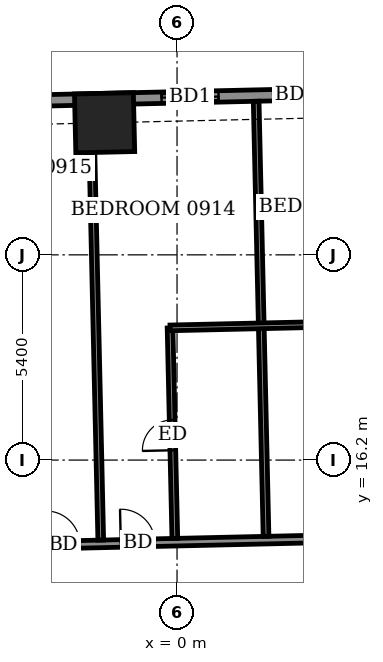
"""IFC4 building model, lengths in metres.
Left out: names, types, materials, properties, quantities, classifications, styles, units other than length and angle.
Written with IfcOpenShell. Run it as: python <this file> out.ifc"""

import sys

from ifc_helpers import new_model, si_unit, direction, frame, frame_2d, origin, origin_2d, place, context, subcontext, project, spatial, rectangle, extrude, element, fill, save


model = new_model("IFC4")
c1 = context("Model", 3, precision=1e-05, world=origin(), true_north=direction((0.0, 1.0)))
c2 = subcontext(c1, "Body", "Model", "MODEL_VIEW")
j1 = project(units=[si_unit("LENGTHUNIT", "METRE"), si_unit("PLANEANGLEUNIT", "RADIAN")], contexts=[c1])
p1 = place(None, origin())
s1 = spatial("IfcSite", under=j1, at=p1, CompositionType="ELEMENT")
p2 = place(p1, origin())
s2 = spatial("IfcBuilding", under=s1, at=p2, CompositionType="ELEMENT")
p3 = place(p2, frame((0.0, 0.0, 41.3)))
s3 = spatial("IfcBuildingStorey", under=s2, at=p3, CompositionType="ELEMENT", Elevation=41.3)
p4 = place(p3, frame((-1.906, 25.075, -0.55), z_axis=(0.0, 0.0, 1.0), x_axis=(-0.999741913532, -0.022717973655, 0.0)))
e1 = element("IfcColumn", 1, at=p4, inside=s3, PredefinedType="COLUMN", context=c2, shape_type="SweptSolid", body=[
    extrude(rectangle(XDim=1.55, YDim=1.55, at=origin_2d()), origin(), (0.0, 0.0, 1.0), 3.6),
])
p5 = place(p3, frame((24.423, 26.298, 0.0), z_axis=(0.0, 0.0, 1.0), x_axis=(-0.999742433108, -0.022695097355, 0.0)))
e2 = element("IfcWall", 2, at=p5, inside=s3, PredefinedType="SOLIDWALL", context=c2, shape_type="SweptSolid", body=[
    extrude(rectangle(XDim=52.701, YDim=0.3, at=frame_2d((26.35, 0.0))), origin(), (0.0, 0.0, 1.0), 3.05),
])
p6 = place(p5, frame((2.357, 0.0, 0.0)))
e3 = element("IfcOpeningElement", 3, at=p6, cuts=e2, PredefinedType="OPENING", context=c2, shape_type="SweptSolid", body=[
    extrude(rectangle(XDim=1.5, YDim=2.4, at=frame_2d((0.75, 1.2))), frame((0.0, 0.16, 0.0), z_axis=(0.0, -1.0, 0.0), x_axis=(1.0, 0.0, 0.0)), (0.0, 0.0, 1.0), 0.32),
])
p7 = place(p5, frame((7.475, 0.0, 0.0)))
e4 = element("IfcOpeningElement", 4, at=p7, cuts=e2, PredefinedType="OPENING", context=c2, shape_type="SweptSolid", body=[
    extrude(rectangle(XDim=1.5, YDim=2.4, at=frame_2d((0.75, 1.2))), frame((0.0, 0.16, 0.0), z_axis=(0.0, -1.0, 0.0), x_axis=(1.0, 0.0, 0.0)), (0.0, 0.0, 1.0), 0.32),
])
p8 = place(p5, frame((10.262, 0.0, 0.0)))
e5 = element("IfcOpeningElement", 5, at=p8, cuts=e2, PredefinedType="OPENING", context=c2, shape_type="SweptSolid", body=[
    extrude(rectangle(XDim=1.5, YDim=2.4, at=frame_2d((0.75, 1.2))), frame((0.0, 0.16, 0.0), z_axis=(0.0, -1.0, 0.0), x_axis=(1.0, 0.0, 0.0)), (0.0, 0.0, 1.0), 0.32),
])
p9 = place(p5, frame((15.1, 0.0, 0.0)))
e6 = element("IfcOpeningElement", 6, at=p9, cuts=e2, PredefinedType="OPENING", context=c2, shape_type="SweptSolid", body=[
    extrude(rectangle(XDim=1.5, YDim=2.4, at=frame_2d((0.75, 1.2))), frame((0.0, 0.16, 0.0), z_axis=(0.0, -1.0, 0.0), x_axis=(1.0, 0.0, 0.0)), (0.0, 0.0, 1.0), 0.32),
])
p10 = place(p5, frame((20.7, 0.0, 0.0)))
e7 = element("IfcOpeningElement", 7, at=p10, cuts=e2, PredefinedType="OPENING", context=c2, shape_type="SweptSolid", body=[
    extrude(rectangle(XDim=1.2, YDim=2.4, at=frame_2d((0.6, 1.2))), frame((0.0, 0.16, 0.0), z_axis=(0.0, -1.0, 0.0), x_axis=(1.0, 0.0, 0.0)), (0.0, 0.0, 1.0), 0.32),
])
p11 = place(p5, frame((23.337, 0.0, 0.0)))
e8 = element("IfcOpeningElement", 8, at=p11, cuts=e2, PredefinedType="OPENING", context=c2, shape_type="SweptSolid", body=[
    extrude(rectangle(XDim=1.5, YDim=2.4, at=frame_2d((0.75, 1.2))), frame((0.0, 0.16, 0.0), z_axis=(0.0, -1.0, 0.0), x_axis=(1.0, 0.0, 0.0)), (0.0, 0.0, 1.0), 0.32),
])
p12 = place(p5, frame((28.238, 0.0, 0.0)))
e9 = element("IfcOpeningElement", 9, at=p12, cuts=e2, PredefinedType="OPENING", context=c2, shape_type="SweptSolid", body=[
    extrude(rectangle(XDim=1.5, YDim=2.4, at=frame_2d((0.75, 1.2))), frame((0.0, 0.16, 0.0), z_axis=(0.0, -1.0, 0.0), x_axis=(1.0, 0.0, 0.0)), (0.0, 0.0, 1.0), 0.32),
])
p13 = place(p5, frame((33.9, 0.0, 0.0)))
e10 = element("IfcOpeningElement", 10, at=p13, cuts=e2, PredefinedType="OPENING", context=c2, shape_type="SweptSolid", body=[
    extrude(rectangle(XDim=1.2, YDim=2.4, at=frame_2d((0.6, 1.2))), frame((0.0, 0.16, 0.0), z_axis=(0.0, -1.0, 0.0), x_axis=(1.0, 0.0, 0.0)), (0.0, 0.0, 1.0), 0.32),
])
p14 = place(p5, frame((36.538, 0.0, 0.0)))
e11 = element("IfcOpeningElement", 11, at=p14, cuts=e2, PredefinedType="OPENING", context=c2, shape_type="SweptSolid", body=[
    extrude(rectangle(XDim=1.5, YDim=2.4, at=frame_2d((0.75, 1.2))), frame((0.0, 0.16, 0.0), z_axis=(0.0, -1.0, 0.0), x_axis=(1.0, 0.0, 0.0)), (0.0, 0.0, 1.0), 0.32),
])
p15 = place(p5, frame((41.338, 0.0, 0.0)))
e12 = element("IfcOpeningElement", 12, at=p15, cuts=e2, PredefinedType="OPENING", context=c2, shape_type="SweptSolid", body=[
    extrude(rectangle(XDim=1.5, YDim=2.4, at=frame_2d((0.75, 1.2))), frame((0.0, 0.16, 0.0), z_axis=(0.0, -1.0, 0.0), x_axis=(1.0, 0.0, 0.0)), (0.0, 0.0, 1.0), 0.32),
])
p16 = place(p5, frame((44.4, 0.0, 0.9)))
e13 = element("IfcOpeningElement", 13, at=p16, cuts=e2, PredefinedType="OPENING", context=c2, shape_type="SweptSolid", body=[
    extrude(rectangle(XDim=0.9, YDim=1.5, at=frame_2d((0.45, 0.75))), frame((0.0, 0.16, 0.0), z_axis=(0.0, -1.0, 0.0), x_axis=(1.0, 0.0, 0.0)), (0.0, 0.0, 1.0), 0.32),
])
p17 = place(p5, frame((48.764, 0.0, 0.9)))
e14 = element("IfcOpeningElement", 14, at=p17, cuts=e2, PredefinedType="OPENING", context=c2, shape_type="SweptSolid", body=[
    extrude(rectangle(XDim=2.4, YDim=1.5, at=frame_2d((1.2, 0.75))), frame((0.0, 0.16, 0.0), z_axis=(0.0, -1.0, 0.0), x_axis=(1.0, 0.0, 0.0)), (0.0, 0.0, 1.0), 0.32),
])
p18 = place(p3, frame((-1.953, 27.149, 0.0), z_axis=(0.0, 0.0, 1.0), x_axis=(0.999743226877, 0.02266010399, 0.0)))
e15 = element("IfcWall", 15, at=p18, inside=s3, PredefinedType="USERDEFINED", context=c2, shape_type="SweptSolid", body=[
    extrude(rectangle(XDim=5.699, YDim=0.55, at=frame_2d((2.85, 0.0))), origin(), (0.0, 0.0, 1.0), 0.8),
])
p19 = place(p3, frame((-31.347, 13.329, 0.0), z_axis=(0.0, 0.0, 1.0), x_axis=(0.999742613079, 0.022687168058, 0.0)))
e16 = element("IfcWall", 16, at=p19, inside=s3, PredefinedType="PARTITIONING", context=c2, shape_type="SweptSolid", body=[
    extrude(rectangle(XDim=58.799, YDim=0.2, at=frame_2d((29.399, 0.0))), origin(), (0.0, 0.0, 1.0), 3.05),
])
p20 = place(p19, frame((56.45, 0.0, 0.0)))
e17 = element("IfcOpeningElement", 17, at=p20, cuts=e16, PredefinedType="OPENING", context=c2, shape_type="SweptSolid", body=[
    extrude(rectangle(XDim=1.0, YDim=2.1, at=frame_2d((0.5, 1.05))), frame((0.0, 0.11, 0.0), z_axis=(0.0, -1.0, 0.0), x_axis=(1.0, 0.0, 0.0)), (0.0, 0.0, 1.0), 0.22),
])
p21 = place(p19, frame((51.85, 0.0, 0.0)))
e18 = element("IfcOpeningElement", 18, at=p21, cuts=e16, PredefinedType="OPENING", context=c2, shape_type="SweptSolid", body=[
    extrude(rectangle(XDim=0.9, YDim=2.1, at=frame_2d((0.45, 1.05))), frame((0.0, 0.11, 0.0), z_axis=(0.0, -1.0, 0.0), x_axis=(1.0, 0.0, 0.0)), (0.0, 0.0, 1.0), 0.22),
])
p22 = place(p19, frame((47.1, 0.0, 0.0)))
e19 = element("IfcOpeningElement", 19, at=p22, cuts=e16, PredefinedType="OPENING", context=c2, shape_type="SweptSolid", body=[
    extrude(rectangle(XDim=0.9, YDim=2.1, at=frame_2d((0.45, 1.05))), frame((0.0, 0.11, 0.0), z_axis=(0.0, -1.0, 0.0), x_axis=(1.0, 0.0, 0.0)), (0.0, 0.0, 1.0), 0.22),
])
p23 = place(p19, frame((45.225, 0.0, 0.0)))
e20 = element("IfcOpeningElement", 20, at=p23, cuts=e16, PredefinedType="OPENING", context=c2, shape_type="SweptSolid", body=[
    extrude(rectangle(XDim=0.9, YDim=2.1, at=frame_2d((0.45, 1.05))), frame((0.0, 0.11, 0.0), z_axis=(0.0, -1.0, 0.0), x_axis=(1.0, 0.0, 0.0)), (0.0, 0.0, 1.0), 0.22),
])
p24 = place(p19, frame((38.55, 0.0, 0.0)))
e21 = element("IfcOpeningElement", 21, at=p24, cuts=e16, PredefinedType="OPENING", context=c2, shape_type="SweptSolid", body=[
    extrude(rectangle(XDim=0.9, YDim=2.1, at=frame_2d((0.45, 1.05))), frame((0.0, 0.11, 0.0), z_axis=(0.0, -1.0, 0.0), x_axis=(1.0, 0.0, 0.0)), (0.0, 0.0, 1.0), 0.22),
])
p25 = place(p19, frame((36.625, 0.0, 0.0)))
e22 = element("IfcOpeningElement", 22, at=p25, cuts=e16, PredefinedType="OPENING", context=c2, shape_type="SweptSolid", body=[
    extrude(rectangle(XDim=0.9, YDim=2.1, at=frame_2d((0.45, 1.05))), frame((0.0, 0.11, 0.0), z_axis=(0.0, -1.0, 0.0), x_axis=(1.0, 0.0, 0.0)), (0.0, 0.0, 1.0), 0.22),
])
p26 = place(p19, frame((29.875, 0.0, 0.0)))
e23 = element("IfcOpeningElement", 23, at=p26, cuts=e16, PredefinedType="OPENING", context=c2, shape_type="SweptSolid", body=[
    extrude(rectangle(XDim=0.9, YDim=2.1, at=frame_2d((0.45, 1.05))), frame((0.0, 0.11, 0.0), z_axis=(0.0, -1.0, 0.0), x_axis=(1.0, 0.0, 0.0)), (0.0, 0.0, 1.0), 0.22),
])
p27 = place(p19, frame((27.9, 0.0, 0.0)))
e24 = element("IfcOpeningElement", 24, at=p27, cuts=e16, PredefinedType="OPENING", context=c2, shape_type="SweptSolid", body=[
    extrude(rectangle(XDim=0.9, YDim=2.1, at=frame_2d((0.45, 1.05))), frame((0.0, 0.11, 0.0), z_axis=(0.0, -1.0, 0.0), x_axis=(1.0, 0.0, 0.0)), (0.0, 0.0, 1.0), 0.22),
])
p28 = place(p19, frame((21.1, 0.0, 0.0)))
e25 = element("IfcOpeningElement", 25, at=p28, cuts=e16, PredefinedType="OPENING", context=c2, shape_type="SweptSolid", body=[
    extrude(rectangle(XDim=0.9, YDim=2.1, at=frame_2d((0.45, 1.05))), frame((0.0, 0.11, 0.0), z_axis=(0.0, -1.0, 0.0), x_axis=(1.0, 0.0, 0.0)), (0.0, 0.0, 1.0), 0.22),
])
p29 = place(p19, frame((19.175, 0.0, 0.0)))
e26 = element("IfcOpeningElement", 26, at=p29, cuts=e16, PredefinedType="OPENING", context=c2, shape_type="SweptSolid", body=[
    extrude(rectangle(XDim=0.9, YDim=2.1, at=frame_2d((0.45, 1.05))), frame((0.0, 0.11, 0.0), z_axis=(0.0, -1.0, 0.0), x_axis=(1.0, 0.0, 0.0)), (0.0, 0.0, 1.0), 0.22),
])
p30 = place(p19, frame((12.5, 0.0, 0.0)))
e27 = element("IfcOpeningElement", 27, at=p30, cuts=e16, PredefinedType="OPENING", context=c2, shape_type="SweptSolid", body=[
    extrude(rectangle(XDim=0.9, YDim=2.1, at=frame_2d((0.45, 1.05))), frame((0.0, 0.11, 0.0), z_axis=(0.0, -1.0, 0.0), x_axis=(1.0, 0.0, 0.0)), (0.0, 0.0, 1.0), 0.22),
])
p31 = place(p19, frame((10.575, 0.0, 0.0)))
e28 = element("IfcOpeningElement", 28, at=p31, cuts=e16, PredefinedType="OPENING", context=c2, shape_type="SweptSolid", body=[
    extrude(rectangle(XDim=0.9, YDim=2.1, at=frame_2d((0.45, 1.05))), frame((0.0, 0.11, 0.0), z_axis=(0.0, -1.0, 0.0), x_axis=(1.0, 0.0, 0.0)), (0.0, 0.0, 1.0), 0.22),
])
p32 = place(p19, frame((1.425, 0.0, 0.0)))
e29 = element("IfcOpeningElement", 29, at=p32, cuts=e16, PredefinedType="OPENING", context=c2, shape_type="SweptSolid", body=[
    extrude(rectangle(XDim=1.0, YDim=2.1, at=frame_2d((0.5, 1.05))), frame((0.0, 0.11, 0.0), z_axis=(0.0, -1.0, 0.0), x_axis=(1.0, 0.0, 0.0)), (0.0, 0.0, 1.0), 0.22),
])
p33 = place(p19, frame((6.0, 0.0, 0.0)))
e30 = element("IfcOpeningElement", 30, at=p33, cuts=e16, PredefinedType="OPENING", context=c2, shape_type="SweptSolid", body=[
    extrude(rectangle(XDim=0.9, YDim=2.1, at=frame_2d((0.45, 1.05))), frame((0.0, 0.11, 0.0), z_axis=(0.0, -1.0, 0.0), x_axis=(1.0, 0.0, 0.0)), (0.0, 0.0, 1.0), 0.22),
])
p34 = place(p3, frame((-2.007, 14.095, 0.0), z_axis=(0.0, 0.0, 1.0), x_axis=(-0.022708327922, 0.999742132674, 0.0)))
e31 = element("IfcWall", 31, at=p34, inside=s3, PredefinedType="PARTITIONING", context=c2, shape_type="SweptSolid", body=[
    extrude(rectangle(XDim=11.45, YDim=0.15, at=frame_2d((5.725, 0.0))), origin(), (0.0, 0.0, 1.0), 3.05),
])
p35 = place(p3, frame((-0.058, 14.139, 0.0), z_axis=(0.0, 0.0, 1.0), x_axis=(-0.02273742063, 0.999741471433, 0.0)))
e32 = element("IfcWall", 32, at=p35, inside=s3, PredefinedType="PARTITIONING", context=c2, shape_type="SweptSolid", body=[
    extrude(rectangle(XDim=5.541, YDim=0.15, at=frame_2d((2.77, 0.0))), origin(), (0.0, 0.0, 1.0), 3.05),
])
p36 = place(p35, frame((2.32, 0.0, 0.0)))
e33 = element("IfcOpeningElement", 33, at=p36, cuts=e32, PredefinedType="OPENING", context=c2, shape_type="SweptSolid", body=[
    extrude(rectangle(XDim=0.8, YDim=2.1, at=frame_2d((0.4, 1.05))), frame((0.0, 0.085, 0.0), z_axis=(0.0, -1.0, 0.0), x_axis=(1.0, 0.0, 0.0)), (0.0, 0.0, 1.0), 0.17),
])
p37 = place(p3, frame((2.342, 14.194, 0.0), z_axis=(0.0, 0.0, 1.0), x_axis=(-0.022708327922, 0.999742132674, 0.0)))
e34 = element("IfcWall", 34, at=p37, inside=s3, PredefinedType="PARTITIONING", context=c2, shape_type="SweptSolid", body=[
    extrude(rectangle(XDim=11.45, YDim=0.15, at=frame_2d((5.725, 0.0))), origin(), (0.0, 0.0, 1.0), 2.55),
])
p38 = place(p3, frame((-0.184, 19.678, 0.0), z_axis=(0.0, 0.0, 1.0), x_axis=(0.99974154664, 0.022734113616, 0.0)))
e35 = element("IfcWall", 35, at=p38, inside=s3, PredefinedType="PARTITIONING", context=c2, shape_type="SweptSolid", body=[
    extrude(rectangle(XDim=4.8, YDim=0.15, at=frame_2d((2.4, 0.0))), origin(), (0.0, 0.0, 1.0), 3.05),
])
p39 = place(p10, origin())
e36 = element("IfcDoor", 36, at=p39, inside=s3, OperationType="SLIDING_TO_LEFT", PredefinedType="DOOR", context=c2, shape_type="SweptSolid", body=[
    extrude(rectangle(XDim=1.2, YDim=2.4, at=frame_2d((0.6, 1.2))), frame((0.0, 0.025, 0.0), z_axis=(0.0, -1.0, 0.0), x_axis=(1.0, 0.0, 0.0)), (0.0, 0.0, 1.0), 0.05),
])
fill(e7, e36)
p40 = place(p11, origin())
e37 = element("IfcDoor", 37, at=p40, inside=s3, OperationType="SLIDING_TO_LEFT", PredefinedType="DOOR", context=c2, shape_type="SweptSolid", body=[
    extrude(rectangle(XDim=1.5, YDim=2.4, at=frame_2d((0.75, 1.2))), frame((0.0, 0.025, 0.0), z_axis=(0.0, -1.0, 0.0), x_axis=(1.0, 0.0, 0.0)), (0.0, 0.0, 1.0), 0.05),
])
fill(e8, e37)
p41 = place(p26, origin())
e38 = element("IfcDoor", 38, at=p41, inside=s3, OperationType="SINGLE_SWING_RIGHT", PredefinedType="DOOR", context=c2, shape_type="SweptSolid", body=[
    extrude(rectangle(XDim=0.9, YDim=2.1, at=frame_2d((0.45, 1.05))), frame((0.0, 0.025, 0.0), z_axis=(0.0, -1.0, 0.0), x_axis=(1.0, 0.0, 0.0)), (0.0, 0.0, 1.0), 0.05),
])
fill(e23, e38)
p42 = place(p36, origin())
e39 = element("IfcDoor", 39, at=p42, inside=s3, OperationType="SINGLE_SWING_RIGHT", PredefinedType="DOOR", context=c2, shape_type="SweptSolid", body=[
    extrude(rectangle(XDim=0.8, YDim=2.1, at=frame_2d((0.4, 1.05))), frame((0.0, 0.025, 0.0), z_axis=(0.0, -1.0, 0.0), x_axis=(1.0, 0.0, 0.0)), (0.0, 0.0, 1.0), 0.05),
])
fill(e33, e39)
p43 = place(p27, origin())
e40 = element("IfcDoor", 40, at=p43, inside=s3, OperationType="SINGLE_SWING_LEFT", PredefinedType="DOOR", context=c2, shape_type="SweptSolid", body=[
    extrude(rectangle(XDim=0.9, YDim=2.1, at=frame_2d((0.45, 1.05))), frame((0.0, 0.025, 0.0), z_axis=(0.0, -1.0, 0.0), x_axis=(1.0, 0.0, 0.0)), (0.0, 0.0, 1.0), 0.05),
])
fill(e24, e40)
save(model, sys.argv[1])
